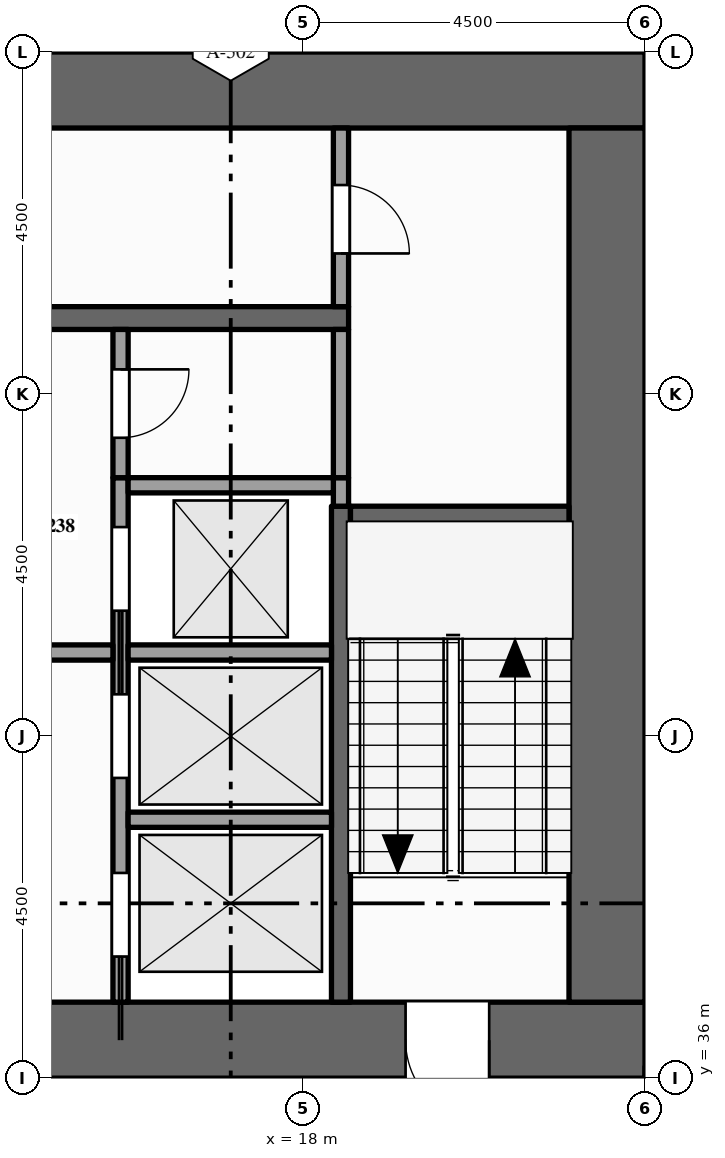
"""IFC4 building model, lengths in metres.
Left out: names, types, materials, properties, quantities, classifications, styles, units other than length and angle.
Written with IfcOpenShell. Run it as: python <this file> out.ifc"""

import sys

from ifc_helpers import new_model, si_unit, direction, frame, frame_2d, origin, place, context, subcontext, project, spatial, rectangle, extrude, element, fill, save


model = new_model("IFC4")
c1 = context("Model", 3, precision=1e-05, world=origin(), true_north=direction((0.0, 1.0)))
c2 = subcontext(c1, "Body", "Model", "MODEL_VIEW")
j1 = project(units=[si_unit("LENGTHUNIT", "METRE"), si_unit("PLANEANGLEUNIT", "RADIAN")], contexts=[c1])
p1 = place(None, origin())
s1 = spatial("IfcSite", under=j1, at=p1, CompositionType="ELEMENT")
p2 = place(p1, origin())
s2 = spatial("IfcBuilding", under=s1, at=p2, CompositionType="ELEMENT")
p3 = place(p2, frame((0.0, 0.0, 211.0)))
s3 = spatial("IfcBuildingStorey", under=s2, at=p3, CompositionType="ELEMENT", Elevation=211.0)
p4 = place(p3, frame((0.0, 36.5, -0.15), z_axis=(0.0, 0.0, 1.0), x_axis=(1.0, 0.0, 0.0)))
e1 = element("IfcWall", 1, at=p4, inside=s3, PredefinedType="SHEAR", context=c2, shape_type="SweptSolid", body=[
    extrude(rectangle(XDim=22.5, YDim=1.0, at=frame_2d((11.25, 0.0))), origin(), (0.0, 0.0, 1.0), 4.0),
])
p5 = place(p4, frame((7.1, 0.0, 0.15)))
e2 = element("IfcOpeningElement", 2, at=p5, cuts=e1, PredefinedType="OPENING", context=c2, shape_type="SweptSolid", body=[
    extrude(rectangle(XDim=1.8, YDim=2.1, at=frame_2d((0.9, 1.05))), frame((0.0, 0.51, 0.0), z_axis=(0.0, -1.0, 0.0), x_axis=(1.0, 0.0, 0.0)), (0.0, 0.0, 1.0), 1.02),
])
p6 = place(p4, frame((13.15, 0.0, 0.15)))
e3 = element("IfcOpeningElement", 3, at=p6, cuts=e1, PredefinedType="OPENING", context=c2, shape_type="SweptSolid", body=[
    extrude(rectangle(XDim=1.1, YDim=2.1, at=frame_2d((0.55, 1.05))), frame((0.0, 0.51, 0.0), z_axis=(0.0, -1.0, 0.0), x_axis=(1.0, 0.0, 0.0)), (0.0, 0.0, 1.0), 1.02),
])
p7 = place(p4, frame((2.15, 0.0, 0.15)))
e4 = element("IfcOpeningElement", 4, at=p7, cuts=e1, PredefinedType="OPENING", context=c2, shape_type="SweptSolid", body=[
    extrude(rectangle(XDim=1.1, YDim=2.1, at=frame_2d((0.55, 1.05))), frame((0.0, 0.51, 0.0), z_axis=(0.0, -1.0, 0.0), x_axis=(1.0, 0.0, 0.0)), (0.0, 0.0, 1.0), 1.02),
])
p8 = place(p4, frame((19.35, 0.0, 0.15)))
e5 = element("IfcOpeningElement", 5, at=p8, cuts=e1, PredefinedType="OPENING", context=c2, shape_type="SweptSolid", body=[
    extrude(rectangle(XDim=1.1, YDim=2.1, at=frame_2d((0.55, 1.05))), frame((0.0, 0.51, 0.0), z_axis=(0.0, -1.0, 0.0), x_axis=(1.0, 0.0, 0.0)), (0.0, 0.0, 1.0), 1.02),
])
p9 = place(p3, frame((0.0, 49.0, -0.15), z_axis=(0.0, 0.0, 1.0), x_axis=(1.0, 0.0, 0.0)))
e6 = element("IfcWall", 6, at=p9, inside=s3, PredefinedType="SHEAR", context=c2, shape_type="SweptSolid", body=[
    extrude(rectangle(XDim=22.5, YDim=1.0, at=frame_2d((11.25, 0.0))), origin(), (0.0, 0.0, 1.0), 4.0),
])
p10 = place(p3, frame((22.0, 37.0, -0.15), z_axis=(0.0, 0.0, 1.0), x_axis=(0.0, 1.0, 0.0)))
e7 = element("IfcWall", 7, at=p10, inside=s3, PredefinedType="SHEAR", context=c2, shape_type="SweptSolid", body=[
    extrude(rectangle(XDim=11.5, YDim=1.0, at=frame_2d((5.75, 0.0))), origin(), (0.0, 0.0, 1.0), 4.0),
])
p11 = place(p3, frame((15.6, 37.0, 0.0), z_axis=(0.0, 0.0, 1.0), x_axis=(0.0, 1.0, 0.0)))
e8 = element("IfcWall", 8, at=p11, inside=s3, PredefinedType="SOLIDWALL", context=c2, shape_type="SweptSolid", body=[
    extrude(rectangle(XDim=6.9, YDim=0.2, at=frame_2d((3.45, 0.0))), origin(), (0.0, 0.0, 1.0), 3.85),
])
p12 = place(p11, frame((0.6, 0.0, 0.012)))
e9 = element("IfcOpeningElement", 9, at=p12, cuts=e8, PredefinedType="OPENING", context=c2, shape_type="SweptSolid", body=[
    extrude(rectangle(XDim=1.1, YDim=2.1, at=frame_2d((0.55, 1.05))), frame((0.0, 0.11, 0.0), z_axis=(0.0, -1.0, 0.0), x_axis=(1.0, 0.0, 0.0)), (0.0, 0.0, 1.0), 0.22),
])
p13 = place(p11, frame((2.95, 0.0, 0.012)))
e10 = element("IfcOpeningElement", 10, at=p13, cuts=e8, PredefinedType="OPENING", context=c2, shape_type="SweptSolid", body=[
    extrude(rectangle(XDim=1.1, YDim=2.1, at=frame_2d((0.55, 1.05))), frame((0.0, 0.11, 0.0), z_axis=(0.0, -1.0, 0.0), x_axis=(1.0, 0.0, 0.0)), (0.0, 0.0, 1.0), 0.22),
])
p14 = place(p11, frame((5.15, 0.0, 0.012)))
e11 = element("IfcOpeningElement", 11, at=p14, cuts=e8, PredefinedType="OPENING", context=c2, shape_type="SweptSolid", body=[
    extrude(rectangle(XDim=1.1, YDim=2.1, at=frame_2d((0.55, 1.05))), frame((0.0, 0.11, 0.0), z_axis=(0.0, -1.0, 0.0), x_axis=(1.0, 0.0, 0.0)), (0.0, 0.0, 1.0), 0.22),
])
p15 = place(p3, frame((15.6, 43.9, 0.0), z_axis=(0.0, 0.0, 1.0), x_axis=(0.0, 1.0, 0.0)))
e12 = element("IfcWall", 12, at=p15, inside=s3, PredefinedType="PARTITIONING", context=c2, shape_type="SweptSolid", body=[
    extrude(rectangle(XDim=1.95, YDim=0.2, at=frame_2d((0.975, 0.0))), origin(), (0.0, 0.0, 1.0), 3.85),
])
p16 = place(p15, frame((0.525, 0.0, 0.0)))
e13 = element("IfcOpeningElement", 13, at=p16, cuts=e12, PredefinedType="OPENING", context=c2, shape_type="SweptSolid", body=[
    extrude(rectangle(XDim=0.9, YDim=2.1, at=frame_2d((0.45, 1.05))), frame((0.0, 0.11, 0.0), z_axis=(0.0, -1.0, 0.0), x_axis=(1.0, 0.0, 0.0)), (0.0, 0.0, 1.0), 0.22),
])
p17 = place(p3, frame((18.5, 37.0, 0.0), z_axis=(0.0, 0.0, 1.0), x_axis=(0.0, 1.0, 0.0)))
e14 = element("IfcWall", 14, at=p17, inside=s3, PredefinedType="SHEAR", context=c2, shape_type="SweptSolid", body=[
    extrude(rectangle(XDim=6.525, YDim=0.25, at=frame_2d((3.262, 0.0))), origin(), (0.0, 0.0, 1.0), 3.85),
])
p18 = place(p3, frame((18.5, 43.525, 0.0), z_axis=(0.0, 0.0, 1.0), x_axis=(0.0, 1.0, 0.0)))
e15 = element("IfcWall", 15, at=p18, inside=s3, PredefinedType="SOLIDWALL", context=c2, shape_type="SweptSolid", body=[
    extrude(rectangle(XDim=0.375, YDim=0.2, at=frame_2d((0.188, 0.0))), origin(), (0.0, 0.0, 1.0), 3.85),
])
p19 = place(p3, frame((18.5, 43.9, 0.0), z_axis=(0.0, 0.0, 1.0), x_axis=(0.0, 1.0, 0.0)))
e16 = element("IfcWall", 16, at=p19, inside=s3, PredefinedType="PARTITIONING", context=c2, shape_type="SweptSolid", body=[
    extrude(rectangle(XDim=1.95, YDim=0.2, at=frame_2d((0.975, 0.0))), origin(), (0.0, 0.0, 1.0), 3.85),
])
p20 = place(p3, frame((18.5, 46.15, 0.0), z_axis=(0.0, 0.0, 1.0), x_axis=(0.0, 1.0, 0.0)))
e17 = element("IfcWall", 17, at=p20, inside=s3, PredefinedType="PARTITIONING", context=c2, shape_type="SweptSolid", body=[
    extrude(rectangle(XDim=2.35, YDim=0.2, at=frame_2d((1.175, 0.0))), origin(), (0.0, 0.0, 1.0), 3.85),
])
p21 = place(p20, frame((0.7, 0.0, 0.0)))
e18 = element("IfcOpeningElement", 18, at=p21, cuts=e17, PredefinedType="OPENING", context=c2, shape_type="SweptSolid", body=[
    extrude(rectangle(XDim=0.9, YDim=2.1, at=frame_2d((0.45, 1.05))), frame((0.0, 0.11, 0.0), z_axis=(0.0, -1.0, 0.0), x_axis=(1.0, 0.0, 0.0)), (0.0, 0.0, 1.0), 0.22),
])
p22 = place(p3, frame((15.7, 39.4, 0.0), z_axis=(0.0, 0.0, 1.0), x_axis=(1.0, 0.0, 0.0)))
e19 = element("IfcWall", 19, at=p22, inside=s3, PredefinedType="SOLIDWALL", context=c2, shape_type="SweptSolid", body=[
    extrude(rectangle(XDim=2.675, YDim=0.2, at=frame_2d((1.337, 0.0))), origin(), (0.0, 0.0, 1.0), 3.85),
])
p23 = place(p3, frame((11.9, 41.6, 0.0), z_axis=(0.0, 0.0, 1.0), x_axis=(1.0, 0.0, 0.0)))
e20 = element("IfcWall", 20, at=p23, inside=s3, PredefinedType="PARTITIONING", context=c2, shape_type="SweptSolid", body=[
    extrude(rectangle(XDim=3.6, YDim=0.2, at=frame_2d((1.8, 0.0))), origin(), (0.0, 0.0, 1.0), 3.85),
])
p24 = place(p23, frame((1.3, 0.0, 0.0)))
e21 = element("IfcOpeningElement", 21, at=p24, cuts=e20, PredefinedType="OPENING", context=c2, shape_type="SweptSolid", body=[
    extrude(rectangle(XDim=1.0, YDim=2.1, at=frame_2d((0.5, 1.05))), frame((0.0, 0.11, 0.0), z_axis=(0.0, -1.0, 0.0), x_axis=(1.0, 0.0, 0.0)), (0.0, 0.0, 1.0), 0.22),
])
p25 = place(p3, frame((15.7, 41.6, 0.0), z_axis=(0.0, 0.0, 1.0), x_axis=(1.0, 0.0, 0.0)))
e22 = element("IfcWall", 22, at=p25, inside=s3, PredefinedType="SOLIDWALL", context=c2, shape_type="SweptSolid", body=[
    extrude(rectangle(XDim=2.675, YDim=0.2, at=frame_2d((1.337, 0.0))), origin(), (0.0, 0.0, 1.0), 3.85),
])
p26 = place(p3, frame((18.625, 43.4, 0.0), z_axis=(0.0, 0.0, 1.0), x_axis=(1.0, 0.0, 0.0)))
e23 = element("IfcWall", 23, at=p26, inside=s3, PredefinedType="SHEAR", context=c2, shape_type="SweptSolid", body=[
    extrude(rectangle(XDim=2.875, YDim=0.25, at=frame_2d((1.438, 0.0))), origin(), (0.0, 0.0, 1.0), 3.85),
])
p27 = place(p3, frame((15.7, 43.8, 0.0), z_axis=(0.0, 0.0, 1.0), x_axis=(1.0, 0.0, 0.0)))
e24 = element("IfcWall", 24, at=p27, inside=s3, PredefinedType="SOLIDWALL", context=c2, shape_type="SweptSolid", body=[
    extrude(rectangle(XDim=2.7, YDim=0.2, at=frame_2d((1.35, 0.0))), origin(), (0.0, 0.0, 1.0), 3.85),
])
p28 = place(p3, frame((4.1, 46.0, 0.0), z_axis=(0.0, 0.0, 1.0), x_axis=(1.0, 0.0, 0.0)))
e25 = element("IfcWall", 25, at=p28, inside=s3, PredefinedType="SHEAR", context=c2, shape_type="SweptSolid", body=[
    extrude(rectangle(XDim=14.5, YDim=0.3, at=frame_2d((7.25, 0.0))), origin(), (0.0, 0.0, 1.0), 3.85),
])
p29 = place(p28, frame((3.4, 0.0, 0.0)))
e26 = element("IfcOpeningElement", 26, at=p29, cuts=e25, PredefinedType="OPENING", context=c2, shape_type="SweptSolid", body=[
    extrude(rectangle(XDim=1.0, YDim=2.1, at=frame_2d((0.5, 1.05))), frame((0.0, 0.16, 0.0), z_axis=(0.0, -1.0, 0.0), x_axis=(1.0, 0.0, 0.0)), (0.0, 0.0, 1.0), 0.32),
])
p30 = place(p28, frame((9.1, 0.0, 0.0)))
e27 = element("IfcOpeningElement", 27, at=p30, cuts=e25, PredefinedType="OPENING", context=c2, shape_type="SweptSolid", body=[
    extrude(rectangle(XDim=1.0, YDim=2.1, at=frame_2d((0.5, 1.05))), frame((0.0, 0.16, 0.0), z_axis=(0.0, -1.0, 0.0), x_axis=(1.0, 0.0, 0.0)), (0.0, 0.0, 1.0), 0.32),
])
p31 = place(p12, origin())
e28 = element("IfcDoor", 28, at=p31, inside=s3, OperationType="SLIDING_TO_LEFT", PredefinedType="DOOR", context=c2, shape_type="SweptSolid", body=[
    extrude(rectangle(XDim=1.1, YDim=2.1, at=frame_2d((0.55, 1.05))), frame((0.0, 0.025, 0.0), z_axis=(0.0, -1.0, 0.0), x_axis=(1.0, 0.0, 0.0)), (0.0, 0.0, 1.0), 0.05),
])
fill(e9, e28)
p32 = place(p13, origin())
e29 = element("IfcDoor", 29, at=p32, inside=s3, OperationType="SLIDING_TO_RIGHT", PredefinedType="DOOR", context=c2, shape_type="SweptSolid", body=[
    extrude(rectangle(XDim=1.1, YDim=2.1, at=frame_2d((0.55, 1.05))), frame((0.0, 0.025, 0.0), z_axis=(0.0, -1.0, 0.0), x_axis=(1.0, 0.0, 0.0)), (0.0, 0.0, 1.0), 0.05),
])
fill(e10, e29)
p33 = place(p14, origin())
e30 = element("IfcDoor", 30, at=p33, inside=s3, OperationType="SLIDING_TO_LEFT", PredefinedType="DOOR", context=c2, shape_type="SweptSolid", body=[
    extrude(rectangle(XDim=1.1, YDim=2.1, at=frame_2d((0.55, 1.05))), frame((0.0, 0.025, 0.0), z_axis=(0.0, -1.0, 0.0), x_axis=(1.0, 0.0, 0.0)), (0.0, 0.0, 1.0), 0.05),
])
fill(e11, e30)
p34 = place(p8, origin())
e31 = element("IfcDoor", 31, at=p34, inside=s3, OperationType="SINGLE_SWING_RIGHT", PredefinedType="DOOR", context=c2, shape_type="SweptSolid", body=[
    extrude(rectangle(XDim=1.1, YDim=2.1, at=frame_2d((0.55, 1.05))), frame((0.0, 0.025, 0.0), z_axis=(0.0, -1.0, 0.0), x_axis=(1.0, 0.0, 0.0)), (0.0, 0.0, 1.0), 0.05),
])
fill(e5, e31)
p35 = place(p21, origin())
e32 = element("IfcDoor", 32, at=p35, inside=s3, OperationType="SINGLE_SWING_LEFT", PredefinedType="DOOR", context=c2, shape_type="SweptSolid", body=[
    extrude(rectangle(XDim=0.9, YDim=2.1, at=frame_2d((0.45, 1.05))), frame((0.0, 0.025, 0.0), z_axis=(0.0, -1.0, 0.0), x_axis=(1.0, 0.0, 0.0)), (0.0, 0.0, 1.0), 0.05),
])
fill(e18, e32)
p36 = place(p16, origin())
e33 = element("IfcDoor", 33, at=p36, inside=s3, OperationType="SINGLE_SWING_RIGHT", PredefinedType="DOOR", context=c2, shape_type="SweptSolid", body=[
    extrude(rectangle(XDim=0.9, YDim=2.1, at=frame_2d((0.45, 1.05))), frame((0.0, 0.025, 0.0), z_axis=(0.0, -1.0, 0.0), x_axis=(1.0, 0.0, 0.0)), (0.0, 0.0, 1.0), 0.05),
])
fill(e13, e33)
save(model, sys.argv[1])
